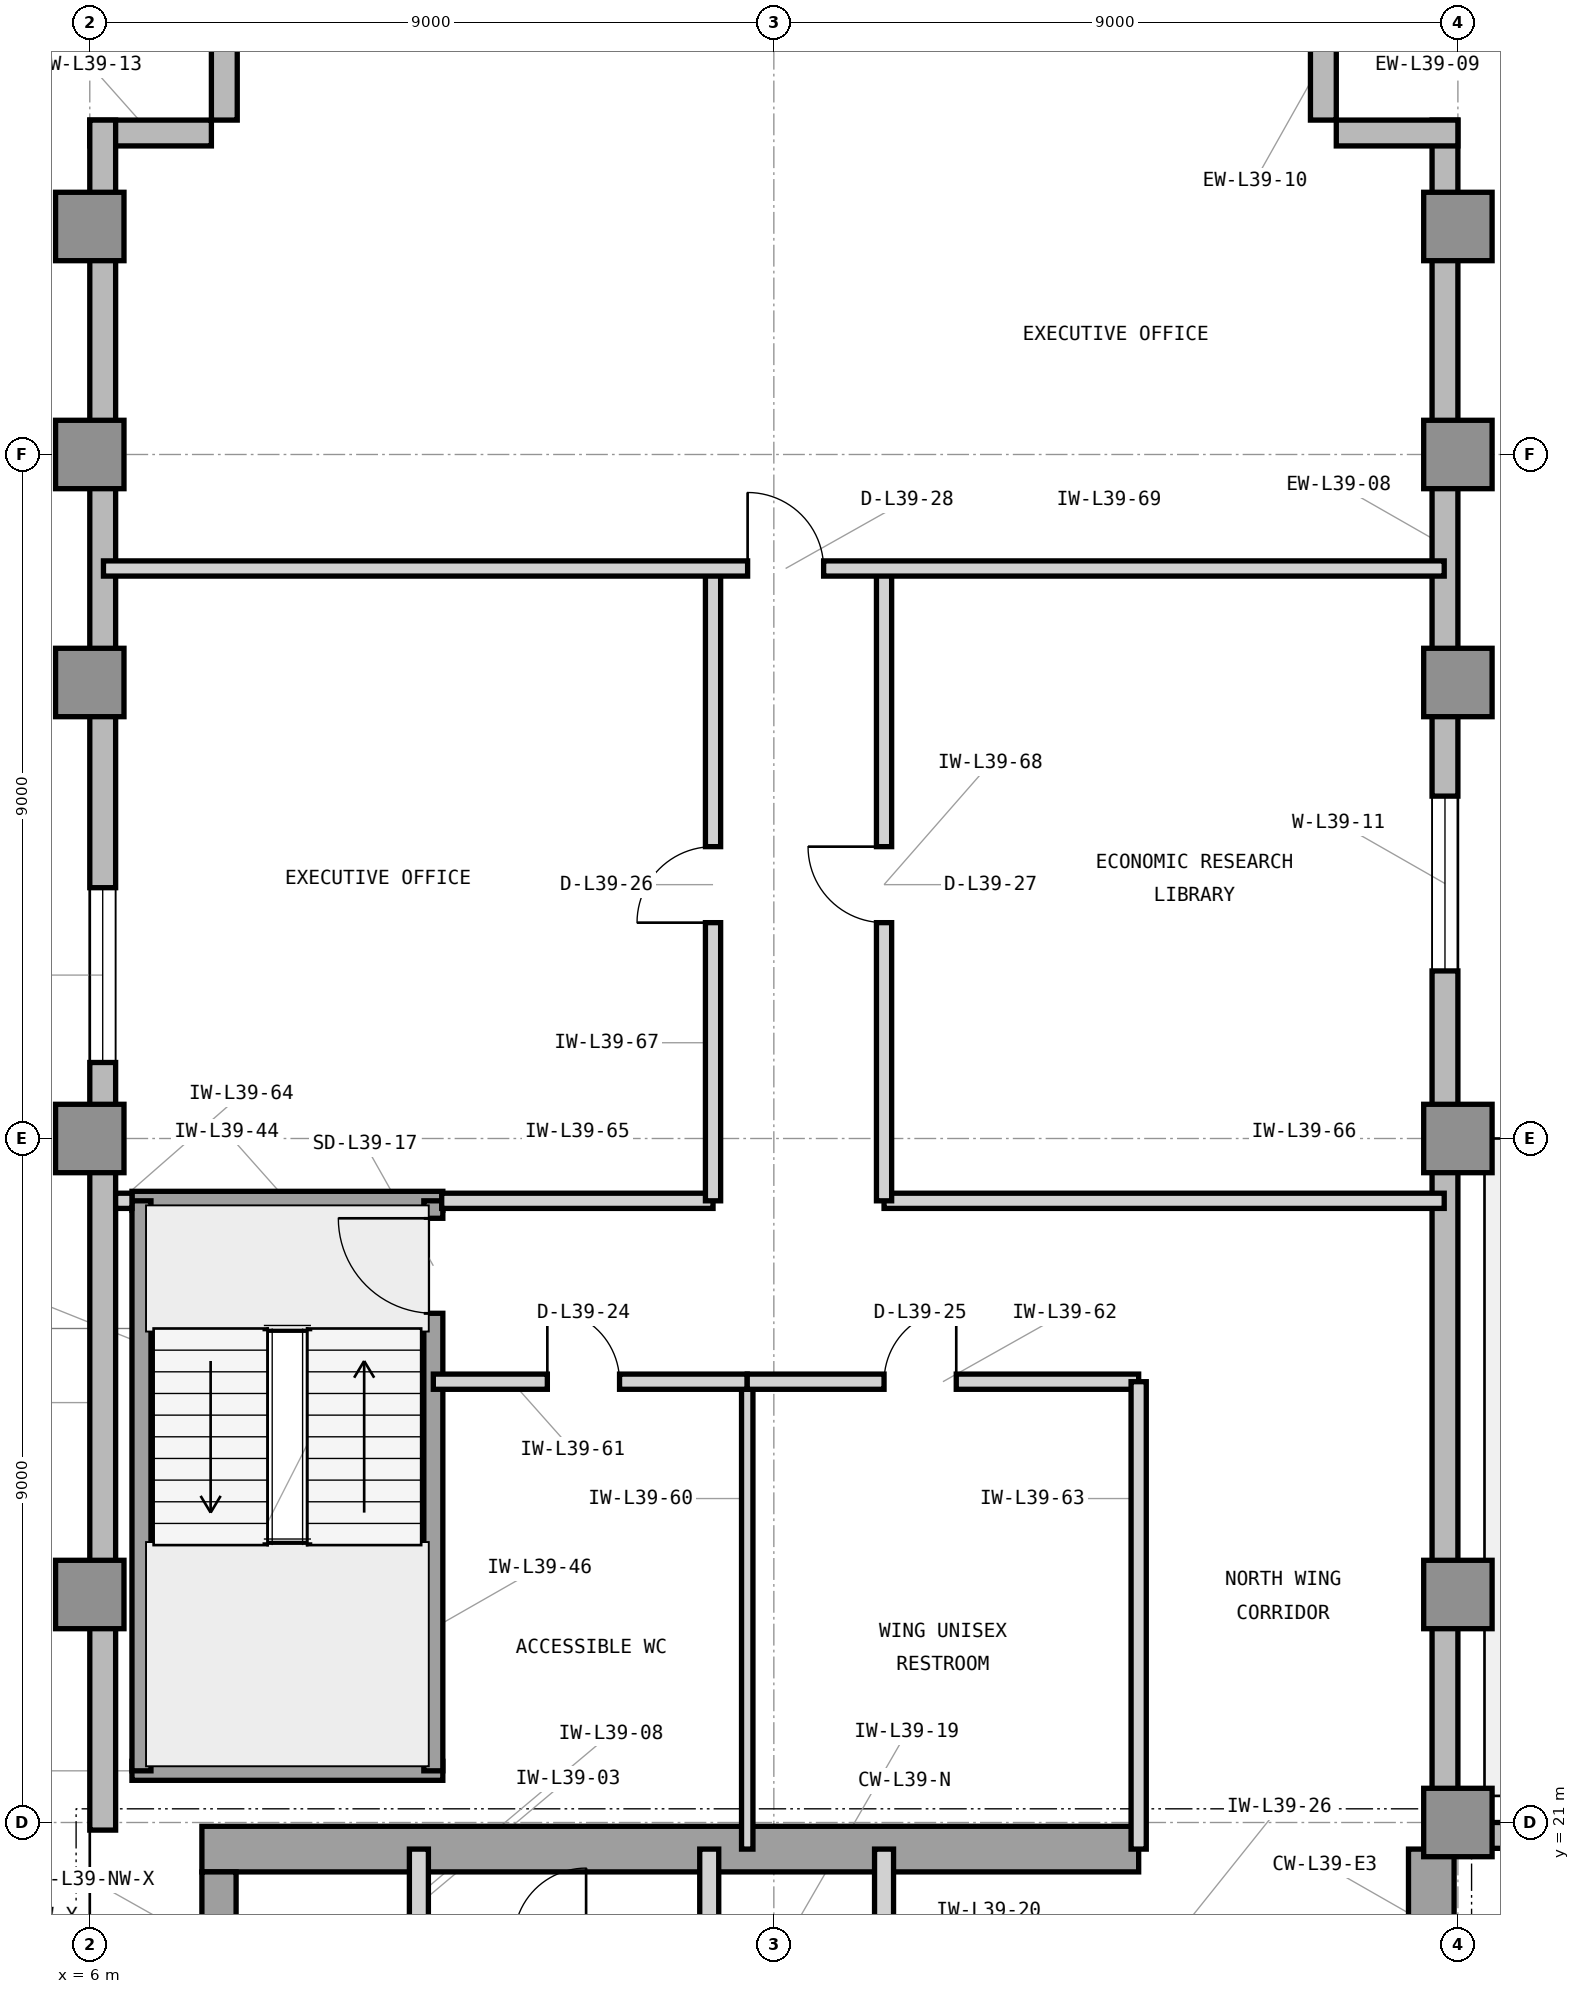
"""IFC4 building model, lengths in metres.
Left out: names, types, materials, properties, quantities, classifications, styles, units other than length and angle.
Written with IfcOpenShell. Run it as: python <this file> out.ifc"""

import sys

from ifc_helpers import new_model, si_unit, direction, frame, frame_2d, origin, origin_2d, place, context, subcontext, project, spatial, rectangle, extrude, element, fill, save


model = new_model("IFC4")
c1 = context("Model", 3, precision=1e-05, world=origin(), true_north=direction((0.0, 1.0)))
c2 = subcontext(c1, "Body", "Model", "MODEL_VIEW")
j1 = project(units=[si_unit("LENGTHUNIT", "METRE"), si_unit("PLANEANGLEUNIT", "RADIAN")], contexts=[c1])
p1 = place(None, origin())
s1 = spatial("IfcSite", under=j1, at=p1, CompositionType="ELEMENT")
p2 = place(p1, origin())
s2 = spatial("IfcBuilding", under=s1, at=p2, CompositionType="ELEMENT")
p3 = place(p2, frame((0.0, 0.0, 164.4)))
s3 = spatial("IfcBuildingStorey", under=s2, at=p3, CompositionType="ELEMENT", Elevation=164.4)
p4 = place(p3, frame((7.475, 20.65, 0.0), z_axis=(0.0, 0.0, 1.0), x_axis=(1.0, 0.0, 0.0)))
e1 = element("IfcWall", 1, at=p4, inside=s3, PredefinedType="SHEAR", context=c2, shape_type="SweptSolid", body=[
    extrude(rectangle(XDim=12.325, YDim=0.6, at=frame_2d((6.163, 0.0))), origin(), (0.0, 0.0, 1.0), 3.9),
])
p5 = place(p3, frame((23.65, 16.6, 0.0), z_axis=(0.0, 0.0, 1.0), x_axis=(0.0, 1.0, 0.0)))
e2 = element("IfcWall", 2, at=p5, inside=s3, PredefinedType="SHEAR", context=c2, shape_type="SweptSolid", body=[
    extrude(rectangle(XDim=4.05, YDim=0.6, at=frame_2d((2.025, 0.0))), origin(), (0.0, 0.0, 1.0), 3.9),
])
p6 = place(p3, frame((7.7, 19.575, 0.0), z_axis=(0.0, 0.0, 1.0), x_axis=(0.0, 1.0, 0.0)))
e3 = element("IfcWall", 3, at=p6, inside=s3, PredefinedType="SHEAR", context=c2, shape_type="SweptSolid", body=[
    extrude(rectangle(XDim=0.775, YDim=0.45, at=frame_2d((0.388, 0.0))), origin(), (0.0, 0.0, 1.0), 3.9),
])
for number, where, z_axis, x_axis in (
    (4, (24.0, 21.0, 0.0), (0.0, 0.0, 1.0), (1.0, 0.0, 0.0)),
    (5, (6.0, 24.0, 0.0), (0.0, 0.0, 1.0), (1.0, 0.0, 0.0)),
    (6, (24.0, 24.0, 0.0), (0.0, 0.0, 1.0), (1.0, 0.0, 0.0)),
    (7, (6.0, 30.0, 0.0), (0.0, 0.0, 1.0), (1.0, 0.0, 0.0)),
    (8, (24.0, 30.0, 0.0), (0.0, 0.0, 1.0), (1.0, 0.0, 0.0)),
    (9, (6.0, 36.0, 0.0), (0.0, 0.0, 1.0), (1.0, 0.0, 0.0)),
    (10, (24.0, 36.0, 0.0), (0.0, 0.0, 1.0), (1.0, 0.0, 0.0)),
    (11, (6.0, 39.0, 0.0), (0.0, 0.0, 1.0), (1.0, 0.0, 0.0)),
    (12, (24.0, 39.0, 0.0), (0.0, 0.0, 1.0), (1.0, 0.0, 0.0)),
    (13, (6.0, 42.0, 0.0), (0.0, 0.0, 1.0), (1.0, 0.0, 0.0)),
    (14, (24.0, 42.0, 0.0), (0.0, 0.0, 1.0), (1.0, 0.0, 0.0)),
):
    element("IfcColumn", number, at=place(p3, frame(where, z_axis=z_axis, x_axis=x_axis)), inside=s3, PredefinedType="COLUMN", context=c2, shape_type="SweptSolid", body=[
        extrude(rectangle(XDim=0.9, YDim=0.9, at=origin_2d()), origin(), (0.0, 0.0, 1.0), 3.9),
    ])
p7 = place(p3, frame((55.4, 20.83, 0.0), z_axis=(0.0, 0.0, 1.0), x_axis=(-1.0, 0.0, 0.0)))
e15 = element("IfcWall", 15, at=p7, inside=s3, PredefinedType="STANDARD", context=c2, shape_type="SweptSolid", body=[
    extrude(rectangle(XDim=31.4, YDim=0.34, at=frame_2d((15.7, 0.0))), origin(), (0.0, 0.0, 1.0), 3.7),
])
p8 = place(p7, frame((25.026, 0.0, 0.9)))
e16 = element("IfcOpeningElement", 16, at=p8, cuts=e15, PredefinedType="OPENING", context=c2, shape_type="SweptSolid", body=[
    extrude(rectangle(XDim=2.3, YDim=2.2, at=frame_2d((1.15, 1.1))), frame((0.0, 0.18, 0.0), z_axis=(0.0, -1.0, 0.0), x_axis=(1.0, 0.0, 0.0)), (0.0, 0.0, 1.0), 0.36),
])
p9 = place(p7, frame((10.125, 0.0, 0.9)))
e17 = element("IfcOpeningElement", 17, at=p9, cuts=e15, PredefinedType="OPENING", context=c2, shape_type="SweptSolid", body=[
    extrude(rectangle(XDim=2.3, YDim=2.2, at=frame_2d((1.15, 1.1))), frame((0.0, 0.18, 0.0), z_axis=(0.0, -1.0, 0.0), x_axis=(1.0, 0.0, 0.0)), (0.0, 0.0, 1.0), 0.36),
])
p10 = place(p3, frame((23.83, 21.0, 0.0), z_axis=(0.0, 0.0, 1.0), x_axis=(0.0, 1.0, 0.0)))
e18 = element("IfcWall", 18, at=p10, inside=s3, PredefinedType="STANDARD", context=c2, shape_type="SweptSolid", body=[
    extrude(rectangle(XDim=22.4, YDim=0.34, at=frame_2d((11.2, 0.0))), origin(), (0.0, 0.0, 1.0), 3.7),
])
p11 = place(p10, frame((11.205, 0.0, 0.9)))
e19 = element("IfcOpeningElement", 19, at=p11, cuts=e18, PredefinedType="OPENING", context=c2, shape_type="SweptSolid", body=[
    extrude(rectangle(XDim=2.3, YDim=2.2, at=frame_2d((1.15, 1.1))), frame((0.0, 0.18, 0.0), z_axis=(0.0, -1.0, 0.0), x_axis=(1.0, 0.0, 0.0)), (0.0, 0.0, 1.0), 0.36),
])
for number, where, z_axis, x_axis in (
    (20, (24.0, 43.23, 0.0), (0.0, 0.0, 1.0), (-1.0, 0.0, 0.0)),
    (21, (22.23, 43.4, 0.0), (0.0, 0.0, 1.0), (0.0, 1.0, 0.0)),
    (22, (7.77, 45.0, 0.0), (0.0, 0.0, 1.0), (0.0, -1.0, 0.0)),
    (23, (7.6, 43.23, 0.0), (0.0, 0.0, 1.0), (-1.0, 0.0, 0.0)),
):
    element("IfcWall", number, at=place(p3, frame(where, z_axis=z_axis, x_axis=x_axis)), inside=s3, PredefinedType="STANDARD", context=c2, shape_type="SweptSolid", body=[
        extrude(rectangle(XDim=1.6, YDim=0.34, at=frame_2d((0.8, 0.0))), origin(), (0.0, 0.0, 1.0), 3.7),
    ])
p12 = place(p3, frame((6.17, 43.4, 0.0), z_axis=(0.0, 0.0, 1.0), x_axis=(0.0, -1.0, 0.0)))
e24 = element("IfcWall", 24, at=p12, inside=s3, PredefinedType="STANDARD", context=c2, shape_type="SweptSolid", body=[
    extrude(rectangle(XDim=22.5, YDim=0.34, at=frame_2d((11.25, 0.0))), origin(), (0.0, 0.0, 1.0), 3.7),
])
p13 = place(p12, frame((10.1, 0.0, 0.9)))
e25 = element("IfcOpeningElement", 25, at=p13, cuts=e24, PredefinedType="OPENING", context=c2, shape_type="SweptSolid", body=[
    extrude(rectangle(XDim=2.3, YDim=2.2, at=frame_2d((1.15, 1.1))), frame((0.0, 0.18, 0.0), z_axis=(0.0, -1.0, 0.0), x_axis=(1.0, 0.0, 0.0)), (0.0, 0.0, 1.0), 0.36),
])
p14 = place(p3, frame((10.33, 19.45, 0.0), z_axis=(0.0, 0.0, 1.0), x_axis=(0.0, 1.0, 0.0)))
e26 = element("IfcWall", 26, at=p14, inside=s3, PredefinedType="PARTITIONING", context=c2, shape_type="SweptSolid", body=[
    extrude(rectangle(XDim=1.2, YDim=0.25, at=frame_2d((0.6, 0.0))), origin(), (0.0, 0.0, 1.0), 3.073),
])
for number, where, z_axis, x_axis in (
    (27, (14.15, 16.7, 0.0), (0.0, 0.0, 1.0), (0.0, 1.0, 0.0)),
    (28, (16.45, 16.7, 0.0), (0.0, 0.0, 1.0), (0.0, 1.0, 0.0)),
):
    element("IfcWall", number, at=place(p3, frame(where, z_axis=z_axis, x_axis=x_axis)), inside=s3, PredefinedType="PARTITIONING", context=c2, shape_type="SweptSolid", body=[
        extrude(rectangle(XDim=3.95, YDim=0.25, at=frame_2d((1.975, 0.0))), origin(), (0.0, 0.0, 1.0), 3.69),
    ])
for number, where, z_axis, x_axis in (
    (29, (6.555, 21.68, 0.0), (0.0, 0.0, 1.0), (1.0, 0.0, 0.0)),
    (30, (6.555, 29.18, 0.0), (0.0, 0.0, 1.0), (1.0, 0.0, 0.0)),
):
    element("IfcWall", number, at=place(p3, frame(where, z_axis=z_axis, x_axis=x_axis)), inside=s3, PredefinedType="SHEAR", context=c2, shape_type="SweptSolid", body=[
        extrude(rectangle(XDim=4.09, YDim=0.25, at=frame_2d((2.045, 0.0))), origin(), (0.0, 0.0, 1.0), 3.9),
    ])
p15 = place(p3, frame((6.68, 21.68, 0.0), z_axis=(0.0, 0.0, 1.0), x_axis=(0.0, 1.0, 0.0)))
e31 = element("IfcWall", 31, at=p15, inside=s3, PredefinedType="SHEAR", context=c2, shape_type="SweptSolid", body=[
    extrude(rectangle(XDim=7.5, YDim=0.25, at=frame_2d((3.75, 0.0))), origin(), (0.0, 0.0, 1.0), 3.9),
])
p16 = place(p3, frame((10.52, 21.68, 0.0), z_axis=(0.0, 0.0, 1.0), x_axis=(0.0, 1.0, 0.0)))
e32 = element("IfcWall", 32, at=p16, inside=s3, PredefinedType="SHEAR", context=c2, shape_type="SweptSolid", body=[
    extrude(rectangle(XDim=7.5, YDim=0.25, at=frame_2d((3.75, 0.0))), origin(), (0.0, 0.0, 1.0), 3.9),
])
p17 = place(p16, frame((6.02, 0.0, 0.0)))
e33 = element("IfcOpeningElement", 33, at=p17, cuts=e32, PredefinedType="OPENING", context=c2, shape_type="SweptSolid", body=[
    extrude(rectangle(XDim=1.25, YDim=2.2, at=frame_2d((0.625, 1.1))), frame((0.0, 0.135, 0.0), z_axis=(0.0, -1.0, 0.0), x_axis=(1.0, 0.0, 0.0)), (0.0, 0.0, 1.0), 0.27),
])
p18 = place(p3, frame((14.65, 20.65, 0.0), z_axis=(0.0, 0.0, 1.0), x_axis=(0.0, 1.0, 0.0)))
e34 = element("IfcWall", 34, at=p18, inside=s3, PredefinedType="PARTITIONING", context=c2, shape_type="SweptSolid", body=[
    extrude(rectangle(XDim=6.15, YDim=0.15, at=frame_2d((3.075, 0.0))), origin(), (0.0, 0.0, 1.0), 3.69),
])
p19 = place(p3, frame((10.52, 26.8, 0.0), z_axis=(0.0, 0.0, 1.0), x_axis=(1.0, 0.0, 0.0)))
e35 = element("IfcWall", 35, at=p19, inside=s3, PredefinedType="PARTITIONING", context=c2, shape_type="SweptSolid", body=[
    extrude(rectangle(XDim=4.13, YDim=0.2, at=frame_2d((2.065, 0.0))), origin(), (0.0, 0.0, 1.0), 3.69),
])
p20 = place(p19, frame((1.5, 0.0, 0.0)))
e36 = element("IfcOpeningElement", 36, at=p20, cuts=e35, PredefinedType="OPENING", context=c2, shape_type="SweptSolid", body=[
    extrude(rectangle(XDim=0.95, YDim=2.1, at=frame_2d((0.475, 1.05))), frame((0.0, 0.11, 0.0), z_axis=(0.0, -1.0, 0.0), x_axis=(1.0, 0.0, 0.0)), (0.0, 0.0, 1.0), 0.22),
])
p21 = place(p3, frame((14.65, 26.8, 0.0), z_axis=(0.0, 0.0, 1.0), x_axis=(1.0, 0.0, 0.0)))
e37 = element("IfcWall", 37, at=p21, inside=s3, PredefinedType="PARTITIONING", context=c2, shape_type="SweptSolid", body=[
    extrude(rectangle(XDim=5.15, YDim=0.2, at=frame_2d((2.575, 0.0))), origin(), (0.0, 0.0, 1.0), 3.69),
])
p22 = place(p21, frame((1.8, 0.0, 0.0)))
e38 = element("IfcOpeningElement", 38, at=p22, cuts=e37, PredefinedType="OPENING", context=c2, shape_type="SweptSolid", body=[
    extrude(rectangle(XDim=0.95, YDim=2.1, at=frame_2d((0.475, 1.05))), frame((0.0, 0.11, 0.0), z_axis=(0.0, -1.0, 0.0), x_axis=(1.0, 0.0, 0.0)), (0.0, 0.0, 1.0), 0.22),
])
p23 = place(p3, frame((19.8, 20.65, 0.0), z_axis=(0.0, 0.0, 1.0), x_axis=(0.0, 1.0, 0.0)))
e39 = element("IfcWall", 39, at=p23, inside=s3, PredefinedType="PARTITIONING", context=c2, shape_type="SweptSolid", body=[
    extrude(rectangle(XDim=6.15, YDim=0.2, at=frame_2d((3.075, 0.0))), origin(), (0.0, 0.0, 1.0), 3.69),
])
p24 = place(p3, frame((6.34, 29.18, 0.0), z_axis=(0.0, 0.0, 1.0), x_axis=(1.0, 0.0, 0.0)))
e40 = element("IfcWall", 40, at=p24, inside=s3, PredefinedType="PARTITIONING", context=c2, shape_type="SweptSolid", body=[
    extrude(rectangle(XDim=0.215, YDim=0.2, at=frame_2d((0.107, 0.0))), origin(), (0.0, 0.0, 1.0), 3.69),
])
p25 = place(p3, frame((10.63, 29.18, 0.0), z_axis=(0.0, 0.0, 1.0), x_axis=(1.0, 0.0, 0.0)))
e41 = element("IfcWall", 41, at=p25, inside=s3, PredefinedType="PARTITIONING", context=c2, shape_type="SweptSolid", body=[
    extrude(rectangle(XDim=3.57, YDim=0.2, at=frame_2d((1.785, 0.0))), origin(), (0.0, 0.0, 1.0), 3.69),
])
p26 = place(p3, frame((16.45, 29.18, 0.0), z_axis=(0.0, 0.0, 1.0), x_axis=(1.0, 0.0, 0.0)))
e42 = element("IfcWall", 42, at=p26, inside=s3, PredefinedType="PARTITIONING", context=c2, shape_type="SweptSolid", body=[
    extrude(rectangle(XDim=7.37, YDim=0.2, at=frame_2d((3.685, 0.0))), origin(), (0.0, 0.0, 1.0), 3.69),
])
p27 = place(p3, frame((14.2, 29.18, 0.0), z_axis=(0.0, 0.0, 1.0), x_axis=(0.0, 1.0, 0.0)))
e43 = element("IfcWall", 43, at=p27, inside=s3, PredefinedType="PARTITIONING", context=c2, shape_type="SweptSolid", body=[
    extrude(rectangle(XDim=8.32, YDim=0.2, at=frame_2d((4.16, 0.0))), origin(), (0.0, 0.0, 1.0), 3.69),
])
p28 = place(p27, frame((3.66, 0.0, 0.0)))
e44 = element("IfcOpeningElement", 44, at=p28, cuts=e43, PredefinedType="OPENING", context=c2, shape_type="SweptSolid", body=[
    extrude(rectangle(XDim=1.0, YDim=2.15, at=frame_2d((0.5, 1.075))), frame((0.0, 0.11, 0.0), z_axis=(0.0, -1.0, 0.0), x_axis=(1.0, 0.0, 0.0)), (0.0, 0.0, 1.0), 0.22),
])
p29 = place(p3, frame((16.45, 29.18, 0.0), z_axis=(0.0, 0.0, 1.0), x_axis=(0.0, 1.0, 0.0)))
e45 = element("IfcWall", 45, at=p29, inside=s3, PredefinedType="PARTITIONING", context=c2, shape_type="SweptSolid", body=[
    extrude(rectangle(XDim=8.32, YDim=0.2, at=frame_2d((4.16, 0.0))), origin(), (0.0, 0.0, 1.0), 3.69),
])
p30 = place(p29, frame((3.66, 0.0, 0.0)))
e46 = element("IfcOpeningElement", 46, at=p30, cuts=e45, PredefinedType="OPENING", context=c2, shape_type="SweptSolid", body=[
    extrude(rectangle(XDim=1.0, YDim=2.15, at=frame_2d((0.5, 1.075))), frame((0.0, 0.11, 0.0), z_axis=(0.0, -1.0, 0.0), x_axis=(1.0, 0.0, 0.0)), (0.0, 0.0, 1.0), 0.22),
])
p31 = place(p3, frame((6.18, 37.5, 0.0), z_axis=(0.0, 0.0, 1.0), x_axis=(1.0, 0.0, 0.0)))
e47 = element("IfcWall", 47, at=p31, inside=s3, PredefinedType="PARTITIONING", context=c2, shape_type="SweptSolid", body=[
    extrude(rectangle(XDim=17.64, YDim=0.2, at=frame_2d((8.82, 0.0))), origin(), (0.0, 0.0, 1.0), 3.69),
])
p32 = place(p31, frame((8.475, 0.0, 0.0)))
e48 = element("IfcOpeningElement", 48, at=p32, cuts=e47, PredefinedType="OPENING", context=c2, shape_type="SweptSolid", body=[
    extrude(rectangle(XDim=1.0, YDim=2.15, at=frame_2d((0.5, 1.075))), frame((0.0, 0.11, 0.0), z_axis=(0.0, -1.0, 0.0), x_axis=(1.0, 0.0, 0.0)), (0.0, 0.0, 1.0), 0.22),
])
p33 = place(p13, origin())
e49 = element("IfcWindow", 49, at=p33, inside=s3, PartitioningType="SINGLE_PANEL", PredefinedType="WINDOW", context=c2, shape_type="SweptSolid", body=[
    extrude(rectangle(XDim=2.3, YDim=2.2, at=frame_2d((1.15, 1.1))), frame((0.0, 0.11, 0.0), z_axis=(0.0, -1.0, 0.0), x_axis=(1.0, 0.0, 0.0)), (0.0, 0.0, 1.0), 0.06),
])
fill(e25, e49)
p34 = place(p17, origin())
e50 = element("IfcDoor", 50, at=p34, inside=s3, OperationType="SINGLE_SWING_RIGHT", PredefinedType="DOOR", context=c2, shape_type="SweptSolid", body=[
    extrude(rectangle(XDim=1.25, YDim=2.2, at=frame_2d((0.625, 1.1))), frame((0.0, 0.025, 0.0), z_axis=(0.0, -1.0, 0.0), x_axis=(1.0, 0.0, 0.0)), (0.0, 0.0, 1.0), 0.05),
])
fill(e33, e50)
p35 = place(p20, origin())
e51 = element("IfcDoor", 51, at=p35, inside=s3, OperationType="SINGLE_SWING_LEFT", PredefinedType="DOOR", context=c2, shape_type="SweptSolid", body=[
    extrude(rectangle(XDim=0.95, YDim=2.1, at=frame_2d((0.475, 1.05))), frame((0.0, 0.025, 0.0), z_axis=(0.0, -1.0, 0.0), x_axis=(1.0, 0.0, 0.0)), (0.0, 0.0, 1.0), 0.05),
])
fill(e36, e51)
p36 = place(p22, origin())
e52 = element("IfcDoor", 52, at=p36, inside=s3, OperationType="SINGLE_SWING_RIGHT", PredefinedType="DOOR", context=c2, shape_type="SweptSolid", body=[
    extrude(rectangle(XDim=0.95, YDim=2.1, at=frame_2d((0.475, 1.05))), frame((0.0, 0.025, 0.0), z_axis=(0.0, -1.0, 0.0), x_axis=(1.0, 0.0, 0.0)), (0.0, 0.0, 1.0), 0.05),
])
fill(e38, e52)
p37 = place(p28, origin())
e53 = element("IfcDoor", 53, at=p37, inside=s3, OperationType="SINGLE_SWING_LEFT", PredefinedType="DOOR", context=c2, shape_type="SweptSolid", body=[
    extrude(rectangle(XDim=1.0, YDim=2.15, at=frame_2d((0.5, 1.075))), frame((0.0, 0.025, 0.0), z_axis=(0.0, -1.0, 0.0), x_axis=(1.0, 0.0, 0.0)), (0.0, 0.0, 1.0), 0.05),
])
fill(e44, e53)
p38 = place(p30, origin())
e54 = element("IfcDoor", 54, at=p38, inside=s3, OperationType="SINGLE_SWING_RIGHT", PredefinedType="DOOR", context=c2, shape_type="SweptSolid", body=[
    extrude(rectangle(XDim=1.0, YDim=2.15, at=frame_2d((0.5, 1.075))), frame((0.0, 0.025, 0.0), z_axis=(0.0, -1.0, 0.0), x_axis=(1.0, 0.0, 0.0)), (0.0, 0.0, 1.0), 0.05),
])
fill(e46, e54)
p39 = place(p32, origin())
e55 = element("IfcDoor", 55, at=p39, inside=s3, OperationType="SINGLE_SWING_LEFT", PredefinedType="DOOR", context=c2, shape_type="SweptSolid", body=[
    extrude(rectangle(XDim=1.0, YDim=2.15, at=frame_2d((0.5, 1.075))), frame((0.0, 0.025, 0.0), z_axis=(0.0, -1.0, 0.0), x_axis=(1.0, 0.0, 0.0)), (0.0, 0.0, 1.0), 0.05),
])
fill(e48, e55)
p40 = place(p11, origin())
e56 = element("IfcWindow", 56, at=p40, inside=s3, PartitioningType="SINGLE_PANEL", PredefinedType="WINDOW", context=c2, shape_type="SweptSolid", body=[
    extrude(rectangle(XDim=2.3, YDim=2.2, at=frame_2d((1.15, 1.1))), frame((0.0, 0.11, 0.0), z_axis=(0.0, -1.0, 0.0), x_axis=(1.0, 0.0, 0.0)), (0.0, 0.0, 1.0), 0.06),
])
fill(e19, e56)
save(model, sys.argv[1])
